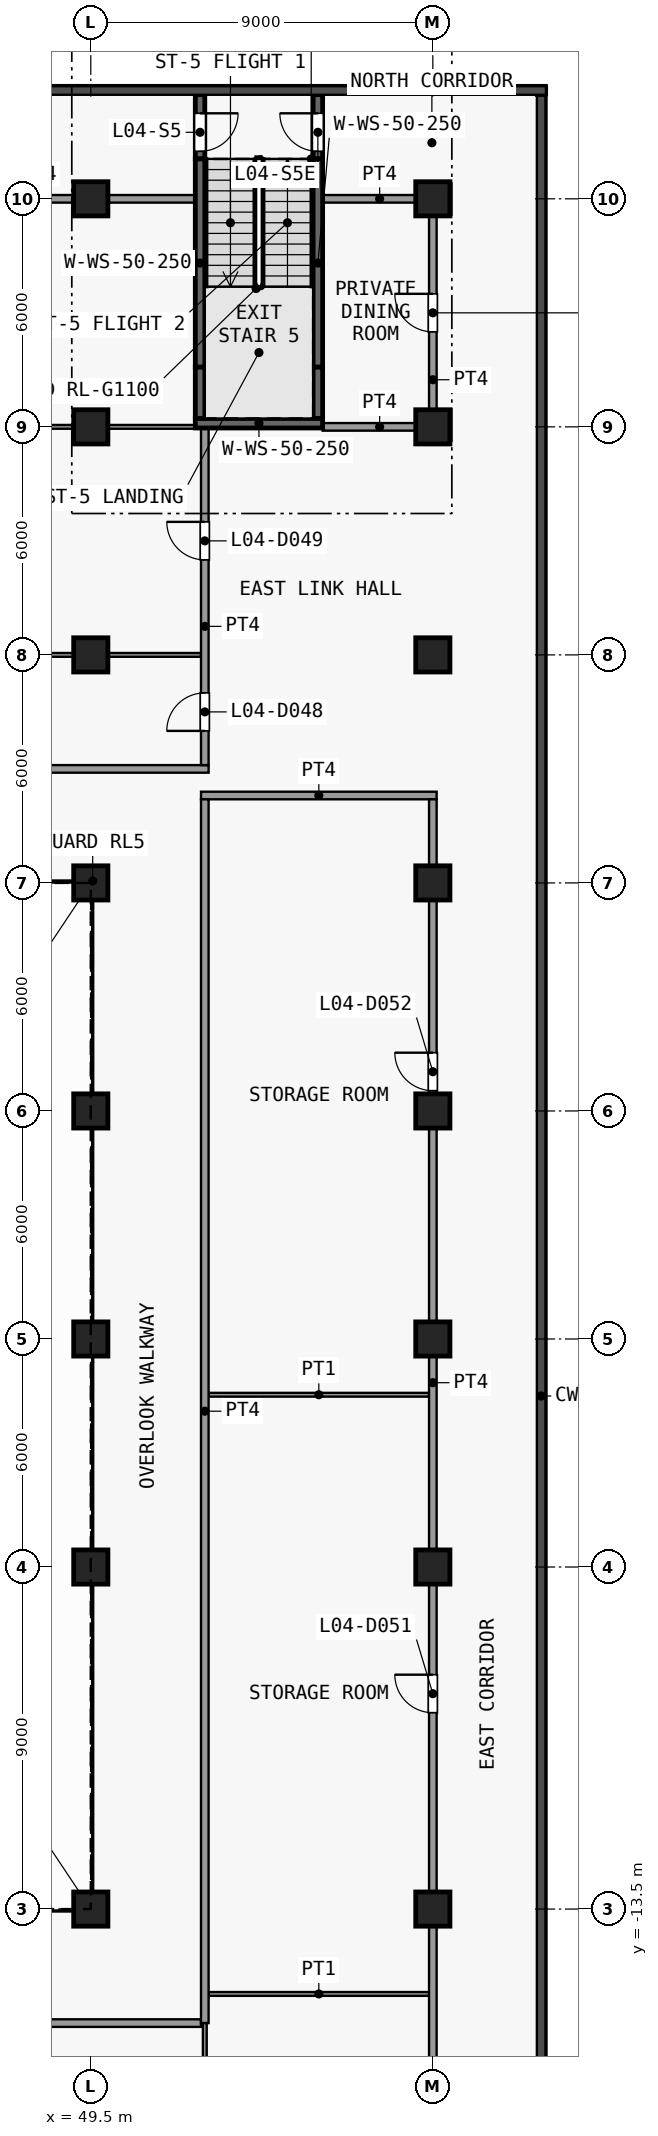
"""IFC4 building model, lengths in metres.
Left out: names, types, materials, properties, quantities, classifications, styles, units other than length and angle.
Written with IfcOpenShell. Run it as: python <this file> out.ifc"""

import sys

from ifc_helpers import new_model, si_unit, direction, frame, frame_2d, origin, origin_2d, place, context, subcontext, project, spatial, rectangle, extrude, element, fill, save


model = new_model("IFC4")
c1 = context("Model", 3, precision=1e-05, world=origin(), true_north=direction((0.0, 1.0)))
c2 = subcontext(c1, "Body", "Model", "MODEL_VIEW")
j1 = project(units=[si_unit("LENGTHUNIT", "METRE"), si_unit("PLANEANGLEUNIT", "RADIAN")], contexts=[c1])
p1 = place(None, origin())
s1 = spatial("IfcSite", under=j1, at=p1, CompositionType="ELEMENT")
p2 = place(p1, origin())
s2 = spatial("IfcBuilding", under=s1, at=p2, CompositionType="ELEMENT")
p3 = place(p2, frame((0.0, 0.0, 23.5)))
s3 = spatial("IfcBuildingStorey", under=s2, at=p3, CompositionType="ELEMENT", Elevation=23.5)
for number, where, z_axis, x_axis in (
    (1, (49.5, -13.5, 0.0), (0.0, 0.0, 1.0), (1.0, 0.0, 0.0)),
    (2, (49.5, -4.5, 0.0), (0.0, 0.0, 1.0), (1.0, 0.0, 0.0)),
    (3, (49.5, 1.5, 0.0), (0.0, 0.0, 1.0), (1.0, 0.0, 0.0)),
    (4, (49.5, 7.5, 0.0), (0.0, 0.0, 1.0), (1.0, 0.0, 0.0)),
    (5, (49.5, 13.5, 0.0), (0.0, 0.0, 1.0), (1.0, 0.0, 0.0)),
    (6, (49.5, 19.5, 0.0), (0.0, 0.0, 1.0), (1.0, 0.0, 0.0)),
    (7, (49.5, 25.5, 0.0), (0.0, 0.0, 1.0), (1.0, 0.0, 0.0)),
    (8, (49.5, 31.5, 0.0), (0.0, 0.0, 1.0), (1.0, 0.0, 0.0)),
    (9, (58.5, -13.5, 0.0), (0.0, 0.0, 1.0), (1.0, 0.0, 0.0)),
    (10, (58.5, -4.5, 0.0), (0.0, 0.0, 1.0), (1.0, 0.0, 0.0)),
    (11, (58.5, 1.5, 0.0), (0.0, 0.0, 1.0), (1.0, 0.0, 0.0)),
    (12, (58.5, 7.5, 0.0), (0.0, 0.0, 1.0), (1.0, 0.0, 0.0)),
    (13, (58.5, 13.5, 0.0), (0.0, 0.0, 1.0), (1.0, 0.0, 0.0)),
    (14, (58.5, 19.5, 0.0), (0.0, 0.0, 1.0), (1.0, 0.0, 0.0)),
    (15, (58.5, 25.5, 0.0), (0.0, 0.0, 1.0), (1.0, 0.0, 0.0)),
    (16, (58.5, 31.5, 0.0), (0.0, 0.0, 1.0), (1.0, 0.0, 0.0)),
):
    element("IfcColumn", number, at=place(p3, frame(where, z_axis=z_axis, x_axis=x_axis)), inside=s3, PredefinedType="COLUMN", context=c2, shape_type="SweptSolid", body=[
        extrude(rectangle(XDim=0.9, YDim=0.9, at=origin_2d()), origin(), (0.0, 0.0, 1.0), 4.5),
    ])
p4 = place(p3, frame((52.375, 34.24, 0.0), z_axis=(0.0, 0.0, 1.0), x_axis=(0.0, -1.0, 0.0)))
e17 = element("IfcWall", 17, at=p4, inside=s3, PredefinedType="SHEAR", context=c2, shape_type="SweptSolid", body=[
    extrude(rectangle(XDim=1.69, YDim=0.25, at=frame_2d((0.845, 0.0))), origin(), (0.0, 0.0, 1.0), 4.15),
])
p5 = place(p4, frame((0.49, 0.0, 0.0)))
e18 = element("IfcOpeningElement", 18, at=p5, cuts=e17, PredefinedType="OPENING", context=c2, shape_type="SweptSolid", body=[
    extrude(rectangle(XDim=1.0, YDim=2.1, at=frame_2d((0.5, 1.05))), frame((0.0, 0.135, 0.0), z_axis=(0.0, -1.0, 0.0), x_axis=(1.0, 0.0, 0.0)), (0.0, 0.0, 1.0), 0.27),
])
p6 = place(p3, frame((52.375, 27.07, 0.0), z_axis=(0.0, 0.0, 1.0), x_axis=(0.0, 1.0, 0.0)))
e19 = element("IfcWall", 19, at=p6, inside=s3, PredefinedType="SHEAR", context=c2, shape_type="SweptSolid", body=[
    extrude(rectangle(XDim=5.48, YDim=0.25, at=frame_2d((2.74, 0.0))), origin(), (0.0, 0.0, 1.0), 4.15),
])
p7 = place(p3, frame((52.375, 25.72, 0.0), z_axis=(0.0, 0.0, 1.0), x_axis=(0.0, 1.0, 0.0)))
e20 = element("IfcWall", 20, at=p7, inside=s3, PredefinedType="SHEAR", context=c2, shape_type="SweptSolid", body=[
    extrude(rectangle(XDim=1.35, YDim=0.25, at=frame_2d((0.675, 0.0))), origin(), (0.0, 0.0, 1.0), 4.15),
])
p8 = place(p3, frame((55.475, 32.55, 0.0), z_axis=(0.0, 0.0, 1.0), x_axis=(0.0, 1.0, 0.0)))
e21 = element("IfcWall", 21, at=p8, inside=s3, PredefinedType="SHEAR", context=c2, shape_type="SweptSolid", body=[
    extrude(rectangle(XDim=1.69, YDim=0.25, at=frame_2d((0.845, 0.0))), origin(), (0.0, 0.0, 1.0), 4.15),
])
p9 = place(p8, frame((0.2, 0.0, 0.0)))
e22 = element("IfcOpeningElement", 22, at=p9, cuts=e21, PredefinedType="OPENING", context=c2, shape_type="SweptSolid", body=[
    extrude(rectangle(XDim=1.0, YDim=2.1, at=frame_2d((0.5, 1.05))), frame((0.0, 0.135, 0.0), z_axis=(0.0, -1.0, 0.0), x_axis=(1.0, 0.0, 0.0)), (0.0, 0.0, 1.0), 0.27),
])
p10 = place(p3, frame((55.475, 27.07, 0.0), z_axis=(0.0, 0.0, 1.0), x_axis=(0.0, 1.0, 0.0)))
e23 = element("IfcWall", 23, at=p10, inside=s3, PredefinedType="SHEAR", context=c2, shape_type="SweptSolid", body=[
    extrude(rectangle(XDim=5.48, YDim=0.25, at=frame_2d((2.74, 0.0))), origin(), (0.0, 0.0, 1.0), 4.15),
])
p11 = place(p3, frame((55.475, 25.72, 0.0), z_axis=(0.0, 0.0, 1.0), x_axis=(0.0, 1.0, 0.0)))
e24 = element("IfcWall", 24, at=p11, inside=s3, PredefinedType="SHEAR", context=c2, shape_type="SweptSolid", body=[
    extrude(rectangle(XDim=1.35, YDim=0.25, at=frame_2d((0.675, 0.0))), origin(), (0.0, 0.0, 1.0), 4.15),
])
p12 = place(p3, frame((52.25, 25.595, 0.0), z_axis=(0.0, 0.0, 1.0), x_axis=(1.0, 0.0, 0.0)))
e25 = element("IfcWall", 25, at=p12, inside=s3, PredefinedType="SHEAR", context=c2, shape_type="SweptSolid", body=[
    extrude(rectangle(XDim=3.35, YDim=0.25, at=frame_2d((1.675, 0.0))), origin(), (0.0, 0.0, 1.0), 4.15),
])
p13 = place(p3, frame((31.4, -16.5, 0.0), z_axis=(0.0, 0.0, 1.0), x_axis=(1.0, 0.0, 0.0)))
e26 = element("IfcWall", 26, at=p13, inside=s3, PredefinedType="PARTITIONING", context=c2, shape_type="SweptSolid", body=[
    extrude(rectangle(XDim=21.0, YDim=0.2, at=frame_2d((10.5, 0.0))), origin(), (0.0, 0.0, 1.0), 4.15),
])
p14 = place(p13, frame((3.2, 0.0, 0.0)))
e27 = element("IfcOpeningElement", 27, at=p14, cuts=e26, PredefinedType="OPENING", context=c2, shape_type="SweptSolid", body=[
    extrude(rectangle(XDim=1.0, YDim=2.1, at=frame_2d((0.5, 1.05))), frame((0.0, 0.11, 0.0), z_axis=(0.0, -1.0, 0.0), x_axis=(1.0, 0.0, 0.0)), (0.0, 0.0, 1.0), 0.22),
])
p15 = place(p13, frame((14.0, 0.0, 0.0)))
e28 = element("IfcOpeningElement", 28, at=p15, cuts=e26, PredefinedType="OPENING", context=c2, shape_type="SweptSolid", body=[
    extrude(rectangle(XDim=1.0, YDim=2.1, at=frame_2d((0.5, 1.05))), frame((0.0, 0.11, 0.0), z_axis=(0.0, -1.0, 0.0), x_axis=(1.0, 0.0, 0.0)), (0.0, 0.0, 1.0), 0.22),
])
for number, where, z_axis, x_axis in (
    (29, (52.6, -15.733, 0.0), (0.0, 0.0, 1.0), (1.0, 0.0, 0.0)),
    (30, (52.6, 0.033, 0.0), (0.0, 0.0, 1.0), (1.0, 0.0, 0.0)),
):
    element("IfcWall", number, at=place(p3, frame(where, z_axis=z_axis, x_axis=x_axis)), inside=s3, PredefinedType="PARTITIONING", context=c2, shape_type="SweptSolid", body=[
        extrude(rectangle(XDim=5.8, YDim=0.1, at=frame_2d((2.9, 0.0))), origin(), (0.0, 0.0, 1.0), 4.15),
    ])
p16 = place(p3, frame((52.4, 15.8, 0.0), z_axis=(0.0, 0.0, 1.0), x_axis=(1.0, 0.0, 0.0)))
e31 = element("IfcWall", 31, at=p16, inside=s3, PredefinedType="PARTITIONING", context=c2, shape_type="SweptSolid", body=[
    extrude(rectangle(XDim=6.2, YDim=0.2, at=frame_2d((3.1, 0.0))), origin(), (0.0, 0.0, 1.0), 4.15),
])
p17 = place(p3, frame((28.4, 16.5, 0.0), z_axis=(0.0, 0.0, 1.0), x_axis=(1.0, 0.0, 0.0)))
e32 = element("IfcWall", 32, at=p17, inside=s3, PredefinedType="PARTITIONING", context=c2, shape_type="SweptSolid", body=[
    extrude(rectangle(XDim=24.2, YDim=0.2, at=frame_2d((12.1, 0.0))), origin(), (0.0, 0.0, 1.0), 4.15),
])
p18 = place(p17, frame((6.2, 0.0, 0.0)))
e33 = element("IfcOpeningElement", 33, at=p18, cuts=e32, PredefinedType="OPENING", context=c2, shape_type="SweptSolid", body=[
    extrude(rectangle(XDim=1.0, YDim=2.1, at=frame_2d((0.5, 1.05))), frame((0.0, 0.11, 0.0), z_axis=(0.0, -1.0, 0.0), x_axis=(1.0, 0.0, 0.0)), (0.0, 0.0, 1.0), 0.22),
])
p19 = place(p17, frame((17.0, 0.0, 0.0)))
e34 = element("IfcOpeningElement", 34, at=p19, cuts=e32, PredefinedType="OPENING", context=c2, shape_type="SweptSolid", body=[
    extrude(rectangle(XDim=1.0, YDim=2.1, at=frame_2d((0.5, 1.05))), frame((0.0, 0.11, 0.0), z_axis=(0.0, -1.0, 0.0), x_axis=(1.0, 0.0, 0.0)), (0.0, 0.0, 1.0), 0.22),
])
p20 = place(p3, frame((28.5, 19.5, 0.0), z_axis=(0.0, 0.0, 1.0), x_axis=(1.0, 0.0, 0.0)))
e35 = element("IfcWall", 35, at=p20, inside=s3, PredefinedType="PARTITIONING", context=c2, shape_type="SweptSolid", body=[
    extrude(rectangle(XDim=23.9, YDim=0.1, at=frame_2d((11.95, 0.0))), origin(), (0.0, 0.0, 1.0), 4.15),
])
p21 = place(p3, frame((55.6, 25.5, 0.0), z_axis=(0.0, 0.0, 1.0), x_axis=(1.0, 0.0, 0.0)))
e36 = element("IfcWall", 36, at=p21, inside=s3, PredefinedType="PARTITIONING", context=c2, shape_type="SweptSolid", body=[
    extrude(rectangle(XDim=3.0, YDim=0.2, at=frame_2d((1.5, 0.0))), origin(), (0.0, 0.0, 1.0), 4.15),
])
p22 = place(p3, frame((-25.5, 25.5, 0.0), z_axis=(0.0, 0.0, 1.0), x_axis=(1.0, 0.0, 0.0)))
e37 = element("IfcWall", 37, at=p22, inside=s3, PredefinedType="PARTITIONING", context=c2, shape_type="SweptSolid", body=[
    extrude(rectangle(XDim=77.75, YDim=0.1, at=frame_2d((38.875, 0.0))), origin(), (0.0, 0.0, 1.0), 4.15),
])
p23 = place(p3, frame((-25.9, 31.5, 0.0), z_axis=(0.0, 0.0, 1.0), x_axis=(1.0, 0.0, 0.0)))
e38 = element("IfcWall", 38, at=p23, inside=s3, PredefinedType="PARTITIONING", context=c2, shape_type="SweptSolid", body=[
    extrude(rectangle(XDim=78.15, YDim=0.2, at=frame_2d((39.075, 0.0))), origin(), (0.0, 0.0, 1.0), 4.15),
])
p24 = place(p23, frame((4.0, 0.0, 0.0)))
e39 = element("IfcOpeningElement", 39, at=p24, cuts=e38, PredefinedType="OPENING", context=c2, shape_type="SweptSolid", body=[
    extrude(rectangle(XDim=1.8, YDim=2.1, at=frame_2d((0.9, 1.05))), frame((0.0, 0.11, 0.0), z_axis=(0.0, -1.0, 0.0), x_axis=(1.0, 0.0, 0.0)), (0.0, 0.0, 1.0), 0.22),
])
p25 = place(p23, frame((18.6, 0.0, 0.0)))
e40 = element("IfcOpeningElement", 40, at=p25, cuts=e38, PredefinedType="OPENING", context=c2, shape_type="SweptSolid", body=[
    extrude(rectangle(XDim=1.8, YDim=2.1, at=frame_2d((0.9, 1.05))), frame((0.0, 0.11, 0.0), z_axis=(0.0, -1.0, 0.0), x_axis=(1.0, 0.0, 0.0)), (0.0, 0.0, 1.0), 0.22),
])
p26 = place(p23, frame((28.8, 0.0, 0.0)))
e41 = element("IfcOpeningElement", 41, at=p26, cuts=e38, PredefinedType="OPENING", context=c2, shape_type="SweptSolid", body=[
    extrude(rectangle(XDim=1.0, YDim=2.1, at=frame_2d((0.5, 1.05))), frame((0.0, 0.11, 0.0), z_axis=(0.0, -1.0, 0.0), x_axis=(1.0, 0.0, 0.0)), (0.0, 0.0, 1.0), 0.22),
])
p27 = place(p23, frame((37.8, 0.0, 0.0)))
e42 = element("IfcOpeningElement", 42, at=p27, cuts=e38, PredefinedType="OPENING", context=c2, shape_type="SweptSolid", body=[
    extrude(rectangle(XDim=1.0, YDim=2.1, at=frame_2d((0.5, 1.05))), frame((0.0, 0.11, 0.0), z_axis=(0.0, -1.0, 0.0), x_axis=(1.0, 0.0, 0.0)), (0.0, 0.0, 1.0), 0.22),
])
p28 = place(p23, frame((49.5, 0.0, 0.0)))
e43 = element("IfcOpeningElement", 43, at=p28, cuts=e38, PredefinedType="OPENING", context=c2, shape_type="SweptSolid", body=[
    extrude(rectangle(XDim=1.0, YDim=2.1, at=frame_2d((0.5, 1.05))), frame((0.0, 0.11, 0.0), z_axis=(0.0, -1.0, 0.0), x_axis=(1.0, 0.0, 0.0)), (0.0, 0.0, 1.0), 0.22),
])
p29 = place(p23, frame((58.3, 0.0, 0.0)))
e44 = element("IfcOpeningElement", 44, at=p29, cuts=e38, PredefinedType="OPENING", context=c2, shape_type="SweptSolid", body=[
    extrude(rectangle(XDim=1.0, YDim=2.1, at=frame_2d((0.5, 1.05))), frame((0.0, 0.11, 0.0), z_axis=(0.0, -1.0, 0.0), x_axis=(1.0, 0.0, 0.0)), (0.0, 0.0, 1.0), 0.22),
])
p30 = place(p23, frame((72.8, 0.0, 0.0)))
e45 = element("IfcOpeningElement", 45, at=p30, cuts=e38, PredefinedType="OPENING", context=c2, shape_type="SweptSolid", body=[
    extrude(rectangle(XDim=1.0, YDim=2.1, at=frame_2d((0.5, 1.05))), frame((0.0, 0.11, 0.0), z_axis=(0.0, -1.0, 0.0), x_axis=(1.0, 0.0, 0.0)), (0.0, 0.0, 1.0), 0.22),
])
p31 = place(p3, frame((55.6, 31.5, 0.0), z_axis=(0.0, 0.0, 1.0), x_axis=(1.0, 0.0, 0.0)))
e46 = element("IfcWall", 46, at=p31, inside=s3, PredefinedType="PARTITIONING", context=c2, shape_type="SweptSolid", body=[
    extrude(rectangle(XDim=3.0, YDim=0.2, at=frame_2d((1.5, 0.0))), origin(), (0.0, 0.0, 1.0), 4.15),
])
p32 = place(p3, frame((52.5, -16.5, 0.0), z_axis=(0.0, 0.0, 1.0), x_axis=(0.0, 1.0, 0.0)))
e47 = element("IfcWall", 47, at=p32, inside=s3, PredefinedType="PARTITIONING", context=c2, shape_type="SweptSolid", body=[
    extrude(rectangle(XDim=32.2, YDim=0.2, at=frame_2d((16.1, 0.0))), origin(), (0.0, 0.0, 1.0), 4.15),
])
p33 = place(p3, frame((52.5, 16.6, 0.0), z_axis=(0.0, 0.0, 1.0), x_axis=(0.0, 1.0, 0.0)))
e48 = element("IfcWall", 48, at=p33, inside=s3, PredefinedType="PARTITIONING", context=c2, shape_type="SweptSolid", body=[
    extrude(rectangle(XDim=8.87, YDim=0.2, at=frame_2d((4.435, 0.0))), origin(), (0.0, 0.0, 1.0), 4.15),
])
p34 = place(p33, frame((0.9, 0.0, 0.0)))
e49 = element("IfcOpeningElement", 49, at=p34, cuts=e48, PredefinedType="OPENING", context=c2, shape_type="SweptSolid", body=[
    extrude(rectangle(XDim=1.0, YDim=2.1, at=frame_2d((0.5, 1.05))), frame((0.0, 0.11, 0.0), z_axis=(0.0, -1.0, 0.0), x_axis=(1.0, 0.0, 0.0)), (0.0, 0.0, 1.0), 0.22),
])
p35 = place(p33, frame((5.4, 0.0, 0.0)))
e50 = element("IfcOpeningElement", 50, at=p35, cuts=e48, PredefinedType="OPENING", context=c2, shape_type="SweptSolid", body=[
    extrude(rectangle(XDim=1.0, YDim=2.1, at=frame_2d((0.5, 1.05))), frame((0.0, 0.11, 0.0), z_axis=(0.0, -1.0, 0.0), x_axis=(1.0, 0.0, 0.0)), (0.0, 0.0, 1.0), 0.22),
])
p36 = place(p3, frame((52.5, -25.47, 0.0), z_axis=(0.0, 0.0, 1.0), x_axis=(0.0, 1.0, 0.0)))
e51 = element("IfcWall", 51, at=p36, inside=s3, PredefinedType="PARTITIONING", context=c2, shape_type="SweptSolid", body=[
    extrude(rectangle(XDim=8.97, YDim=0.1, at=frame_2d((4.485, 0.0))), origin(), (0.0, 0.0, 1.0), 4.15),
])
p37 = place(p3, frame((58.5, -31.4, 0.0), z_axis=(0.0, 0.0, 1.0), x_axis=(0.0, 1.0, 0.0)))
e52 = element("IfcWall", 52, at=p37, inside=s3, PredefinedType="PARTITIONING", context=c2, shape_type="SweptSolid", body=[
    extrude(rectangle(XDim=47.1, YDim=0.2, at=frame_2d((23.55, 0.0))), origin(), (0.0, 0.0, 1.0), 4.15),
])
p38 = place(p37, frame((7.3, 0.0, 0.0)))
e53 = element("IfcOpeningElement", 53, at=p38, cuts=e52, PredefinedType="OPENING", context=c2, shape_type="SweptSolid", body=[
    extrude(rectangle(XDim=1.0, YDim=2.1, at=frame_2d((0.5, 1.05))), frame((0.0, 0.11, 0.0), z_axis=(0.0, -1.0, 0.0), x_axis=(1.0, 0.0, 0.0)), (0.0, 0.0, 1.0), 0.22),
])
p39 = place(p37, frame((23.067, 0.0, 0.0)))
e54 = element("IfcOpeningElement", 54, at=p39, cuts=e52, PredefinedType="OPENING", context=c2, shape_type="SweptSolid", body=[
    extrude(rectangle(XDim=1.0, YDim=2.1, at=frame_2d((0.5, 1.05))), frame((0.0, 0.11, 0.0), z_axis=(0.0, -1.0, 0.0), x_axis=(1.0, 0.0, 0.0)), (0.0, 0.0, 1.0), 0.22),
])
p40 = place(p37, frame((39.433, 0.0, 0.0)))
e55 = element("IfcOpeningElement", 55, at=p40, cuts=e52, PredefinedType="OPENING", context=c2, shape_type="SweptSolid", body=[
    extrude(rectangle(XDim=1.0, YDim=2.1, at=frame_2d((0.5, 1.05))), frame((0.0, 0.11, 0.0), z_axis=(0.0, -1.0, 0.0), x_axis=(1.0, 0.0, 0.0)), (0.0, 0.0, 1.0), 0.22),
])
p41 = place(p3, frame((58.5, 25.6, 0.0), z_axis=(0.0, 0.0, 1.0), x_axis=(0.0, 1.0, 0.0)))
e56 = element("IfcWall", 56, at=p41, inside=s3, PredefinedType="PARTITIONING", context=c2, shape_type="SweptSolid", body=[
    extrude(rectangle(XDim=5.8, YDim=0.2, at=frame_2d((2.9, 0.0))), origin(), (0.0, 0.0, 1.0), 4.15),
])
p42 = place(p41, frame((2.4, 0.0, 0.0)))
e57 = element("IfcOpeningElement", 57, at=p42, cuts=e56, PredefinedType="OPENING", context=c2, shape_type="SweptSolid", body=[
    extrude(rectangle(XDim=1.0, YDim=2.1, at=frame_2d((0.5, 1.05))), frame((0.0, 0.11, 0.0), z_axis=(0.0, -1.0, 0.0), x_axis=(1.0, 0.0, 0.0)), (0.0, 0.0, 1.0), 0.22),
])
p43 = place(p5, origin())
e58 = element("IfcDoor", 58, at=p43, inside=s3, OperationType="SINGLE_SWING_LEFT", PredefinedType="DOOR", context=c2, shape_type="SweptSolid", body=[
    extrude(rectangle(XDim=1.0, YDim=2.1, at=frame_2d((0.5, 1.05))), frame((0.0, 0.025, 0.0), z_axis=(0.0, -1.0, 0.0), x_axis=(1.0, 0.0, 0.0)), (0.0, 0.0, 1.0), 0.05),
])
fill(e18, e58)
p44 = place(p9, origin())
e59 = element("IfcDoor", 59, at=p44, inside=s3, OperationType="SINGLE_SWING_RIGHT", PredefinedType="DOOR", context=c2, shape_type="SweptSolid", body=[
    extrude(rectangle(XDim=1.0, YDim=2.1, at=frame_2d((0.5, 1.05))), frame((0.0, 0.025, 0.0), z_axis=(0.0, -1.0, 0.0), x_axis=(1.0, 0.0, 0.0)), (0.0, 0.0, 1.0), 0.05),
])
fill(e22, e59)
p45 = place(p34, origin())
e60 = element("IfcDoor", 60, at=p45, inside=s3, OperationType="SINGLE_SWING_RIGHT", PredefinedType="DOOR", context=c2, shape_type="SweptSolid", body=[
    extrude(rectangle(XDim=1.0, YDim=2.1, at=frame_2d((0.5, 1.05))), frame((0.0, 0.025, 0.0), z_axis=(0.0, -1.0, 0.0), x_axis=(1.0, 0.0, 0.0)), (0.0, 0.0, 1.0), 0.05),
])
fill(e49, e60)
p46 = place(p35, origin())
e61 = element("IfcDoor", 61, at=p46, inside=s3, OperationType="SINGLE_SWING_LEFT", PredefinedType="DOOR", context=c2, shape_type="SweptSolid", body=[
    extrude(rectangle(XDim=1.0, YDim=2.1, at=frame_2d((0.5, 1.05))), frame((0.0, 0.025, 0.0), z_axis=(0.0, -1.0, 0.0), x_axis=(1.0, 0.0, 0.0)), (0.0, 0.0, 1.0), 0.05),
])
fill(e50, e61)
p47 = place(p39, origin())
e62 = element("IfcDoor", 62, at=p47, inside=s3, OperationType="SINGLE_SWING_LEFT", PredefinedType="DOOR", context=c2, shape_type="SweptSolid", body=[
    extrude(rectangle(XDim=1.0, YDim=2.1, at=frame_2d((0.5, 1.05))), frame((0.0, 0.025, 0.0), z_axis=(0.0, -1.0, 0.0), x_axis=(1.0, 0.0, 0.0)), (0.0, 0.0, 1.0), 0.05),
])
fill(e54, e62)
p48 = place(p40, origin())
e63 = element("IfcDoor", 63, at=p48, inside=s3, OperationType="SINGLE_SWING_LEFT", PredefinedType="DOOR", context=c2, shape_type="SweptSolid", body=[
    extrude(rectangle(XDim=1.0, YDim=2.1, at=frame_2d((0.5, 1.05))), frame((0.0, 0.025, 0.0), z_axis=(0.0, -1.0, 0.0), x_axis=(1.0, 0.0, 0.0)), (0.0, 0.0, 1.0), 0.05),
])
fill(e55, e63)
p49 = place(p42, origin())
e64 = element("IfcDoor", 64, at=p49, inside=s3, OperationType="SINGLE_SWING_LEFT", PredefinedType="DOOR", context=c2, shape_type="SweptSolid", body=[
    extrude(rectangle(XDim=1.0, YDim=2.1, at=frame_2d((0.5, 1.05))), frame((0.0, 0.025, 0.0), z_axis=(0.0, -1.0, 0.0), x_axis=(1.0, 0.0, 0.0)), (0.0, 0.0, 1.0), 0.05),
])
fill(e57, e64)
save(model, sys.argv[1])
